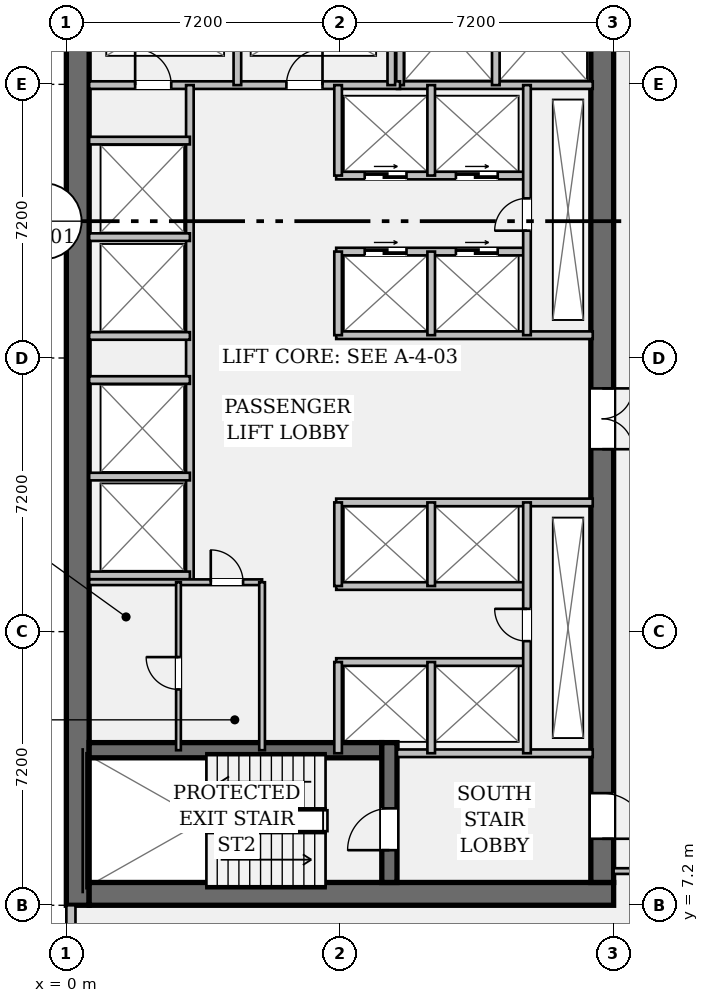
"""IFC4 building model, lengths in metres.
Left out: names, types, materials, properties, quantities, classifications, styles, units other than length and angle.
Written with IfcOpenShell. Run it as: python <this file> out.ifc"""

import sys

from ifc_helpers import new_model, si_unit, direction, frame, frame_2d, origin, place, context, subcontext, project, spatial, rectangle, extrude, element, fill, save


model = new_model("IFC4")
c1 = context("Model", 3, precision=1e-05, world=origin(), true_north=direction((0.0, 1.0)))
c2 = subcontext(c1, "Body", "Model", "MODEL_VIEW")
j1 = project(units=[si_unit("LENGTHUNIT", "METRE"), si_unit("PLANEANGLEUNIT", "RADIAN")], contexts=[c1])
p1 = place(None, origin())
s1 = spatial("IfcSite", under=j1, at=p1, CompositionType="ELEMENT")
p2 = place(p1, origin())
s2 = spatial("IfcBuilding", under=s1, at=p2, CompositionType="ELEMENT")
p3 = place(p2, frame((0.0, 0.0, 9.45)))
s3 = spatial("IfcBuildingStorey", under=s2, at=p3, CompositionType="ELEMENT", Elevation=9.45)
p4 = place(p3, frame((0.3, 7.2, 0.0), z_axis=(0.0, 0.0, 1.0), x_axis=(0.0, 1.0, 0.0)))
e1 = element("IfcWall", 1, at=p4, inside=s3, PredefinedType="SHEAR", context=c2, shape_type="SweptSolid", body=[
    extrude(rectangle(XDim=28.8, YDim=0.6, at=frame_2d((14.4, 0.0))), origin(), (0.0, 0.0, 1.0), 3.9),
])
p5 = place(p3, frame((0.6, 7.5, 0.0), z_axis=(0.0, 0.0, 1.0), x_axis=(1.0, 0.0, 0.0)))
e2 = element("IfcWall", 2, at=p5, inside=s3, PredefinedType="SHEAR", context=c2, shape_type="SweptSolid", body=[
    extrude(rectangle(XDim=13.8, YDim=0.6, at=frame_2d((6.9, 0.0))), origin(), (0.0, 0.0, 1.0), 3.9),
])
p6 = place(p3, frame((14.1, 35.4, 0.0), z_axis=(0.0, 0.0, 1.0), x_axis=(0.0, -1.0, 0.0)))
e3 = element("IfcWall", 3, at=p6, inside=s3, PredefinedType="SHEAR", context=c2, shape_type="SweptSolid", body=[
    extrude(rectangle(XDim=27.6, YDim=0.6, at=frame_2d((13.8, 0.0))), origin(), (0.0, 0.0, 1.0), 3.9),
])
p7 = place(p6, frame((1.3, 0.0, 0.0)))
e4 = element("IfcOpeningElement", 4, at=p7, cuts=e3, PredefinedType="OPENING", context=c2, shape_type="SweptSolid", body=[
    extrude(rectangle(XDim=1.2, YDim=2.15, at=frame_2d((0.6, 1.075))), frame((0.0, 0.312, 0.0), z_axis=(0.0, -1.0, 0.0), x_axis=(1.0, 0.0, 0.0)), (0.0, 0.0, 1.0), 0.624),
])
p8 = place(p6, frame((25.25, 0.0, 0.0)))
e5 = element("IfcOpeningElement", 5, at=p8, cuts=e3, PredefinedType="OPENING", context=c2, shape_type="SweptSolid", body=[
    extrude(rectangle(XDim=1.2, YDim=2.15, at=frame_2d((0.6, 1.075))), frame((0.0, 0.312, 0.0), z_axis=(0.0, -1.0, 0.0), x_axis=(1.0, 0.0, 0.0)), (0.0, 0.0, 1.0), 0.624),
])
p9 = place(p6, frame((14.6, 0.0, 0.0)))
e6 = element("IfcOpeningElement", 6, at=p9, cuts=e3, PredefinedType="OPENING", context=c2, shape_type="SweptSolid", body=[
    extrude(rectangle(XDim=1.6, YDim=2.2, at=frame_2d((0.8, 1.1))), frame((0.0, 0.312, 0.0), z_axis=(0.0, -1.0, 0.0), x_axis=(1.0, 0.0, 0.0)), (0.0, 0.0, 1.0), 0.624),
])
p10 = place(p3, frame((0.6, 11.28, 0.0), z_axis=(0.0, 0.0, 1.0), x_axis=(1.0, 0.0, 0.0)))
e7 = element("IfcWall", 7, at=p10, inside=s3, PredefinedType="SHEAR", context=c2, shape_type="SweptSolid", body=[
    extrude(rectangle(XDim=7.7, YDim=0.4, at=frame_2d((3.85, 0.0))), origin(), (0.0, 0.0, 1.0), 3.9),
])
p11 = place(p3, frame((8.5, 7.8, 0.0), z_axis=(0.0, 0.0, 1.0), x_axis=(0.0, 1.0, 0.0)))
e8 = element("IfcWall", 8, at=p11, inside=s3, PredefinedType="SHEAR", context=c2, shape_type="SweptSolid", body=[
    extrude(rectangle(XDim=3.68, YDim=0.4, at=frame_2d((1.84, 0.0))), origin(), (0.0, 0.0, 1.0), 3.9),
])
p12 = place(p11, frame((0.85, 0.0, 0.0)))
e9 = element("IfcOpeningElement", 9, at=p12, cuts=e8, PredefinedType="OPENING", context=c2, shape_type="SweptSolid", body=[
    extrude(rectangle(XDim=1.1, YDim=2.15, at=frame_2d((0.55, 1.075))), frame((0.0, 0.212, 0.0), z_axis=(0.0, -1.0, 0.0), x_axis=(1.0, 0.0, 0.0)), (0.0, 0.0, 1.0), 0.424),
])
p13 = place(p3, frame((0.12, 2.82, 0.0), z_axis=(0.0, 0.0, 1.0), x_axis=(0.0, 1.0, 0.0)))
e10 = element("IfcWall", 10, at=p13, inside=s3, PredefinedType="STANDARD", context=c2, shape_type="SweptSolid", body=[
    extrude(rectangle(XDim=4.38, YDim=0.24, at=frame_2d((2.19, 0.0))), origin(), (0.0, 0.0, 1.0), 3.9),
])
p14 = place(p13, frame((0.99, 0.0, 0.95)))
e11 = element("IfcOpeningElement", 11, at=p14, cuts=e10, PredefinedType="OPENING", context=c2, shape_type="SweptSolid", body=[
    extrude(rectangle(XDim=2.4, YDim=1.8, at=frame_2d((1.2, 0.9))), frame((0.0, 0.132, 0.0), z_axis=(0.0, -1.0, 0.0), x_axis=(1.0, 0.0, 0.0)), (0.0, 0.0, 1.0), 0.264),
])
for number, where, z_axis, x_axis in (
    (12, (8.7, 11.2, 0.0), (0.0, 0.0, 1.0), (1.0, 0.0, 0.0)),
    (13, (8.7, 28.78, 0.0), (0.0, 0.0, 1.0), (1.0, 0.0, 0.0)),
):
    element("IfcWall", number, at=place(p3, frame(where, z_axis=z_axis, x_axis=x_axis)), inside=s3, PredefinedType="PARTITIONING", context=c2, shape_type="SweptSolid", body=[
        extrude(rectangle(XDim=5.15, YDim=0.2, at=frame_2d((2.575, 0.0))), origin(), (0.0, 0.0, 1.0), 3.9),
    ])
for number, where, z_axis, x_axis in (
    (14, (8.78, 28.78, 0.0), (0.0, 0.0, 1.0), (0.0, 1.0, 0.0)),
    (15, (11.3, 28.78, 0.0), (0.0, 0.0, 1.0), (0.0, 1.0, 0.0)),
):
    element("IfcWall", number, at=place(p3, frame(where, z_axis=z_axis, x_axis=x_axis)), inside=s3, PredefinedType="PARTITIONING", context=c2, shape_type="SweptSolid", body=[
        extrude(rectangle(XDim=3.1, YDim=0.2, at=frame_2d((1.55, 0.0))), origin(), (0.0, 0.0, 1.0), 3.9),
    ])
p15 = place(p3, frame((0.6, 28.78, 0.0), z_axis=(0.0, 0.0, 1.0), x_axis=(1.0, 0.0, 0.0)))
e16 = element("IfcWall", 16, at=p15, inside=s3, PredefinedType="PARTITIONING", context=c2, shape_type="SweptSolid", body=[
    extrude(rectangle(XDim=8.18, YDim=0.2, at=frame_2d((4.09, 0.0))), origin(), (0.0, 0.0, 1.0), 3.9),
])
p16 = place(p15, frame((1.21, 0.0, 0.0)))
e17 = element("IfcOpeningElement", 17, at=p16, cuts=e16, PredefinedType="OPENING", context=c2, shape_type="SweptSolid", body=[
    extrude(rectangle(XDim=0.95, YDim=2.15, at=frame_2d((0.475, 1.075))), frame((0.0, 0.112, 0.0), z_axis=(0.0, -1.0, 0.0), x_axis=(1.0, 0.0, 0.0)), (0.0, 0.0, 1.0), 0.224),
])
p17 = place(p15, frame((5.19, 0.0, 0.0)))
e18 = element("IfcOpeningElement", 18, at=p17, cuts=e16, PredefinedType="OPENING", context=c2, shape_type="SweptSolid", body=[
    extrude(rectangle(XDim=0.95, YDim=2.15, at=frame_2d((0.475, 1.075))), frame((0.0, 0.112, 0.0), z_axis=(0.0, -1.0, 0.0), x_axis=(1.0, 0.0, 0.0)), (0.0, 0.0, 1.0), 0.224),
])
for number, where, z_axis, x_axis in (
    (19, (4.5, 28.78, 0.0), (0.0, 0.0, 1.0), (0.0, 1.0, 0.0)),
    (20, (8.55, 28.78, 0.0), (0.0, 0.0, 1.0), (0.0, 1.0, 0.0)),
):
    element("IfcWall", number, at=place(p3, frame(where, z_axis=z_axis, x_axis=x_axis)), inside=s3, PredefinedType="PARTITIONING", context=c2, shape_type="SweptSolid", body=[
        extrude(rectangle(XDim=2.94, YDim=0.2, at=frame_2d((1.47, 0.0))), origin(), (0.0, 0.0, 1.0), 3.9),
    ])
p18 = place(p3, frame((3.25, 15.7, 0.0), z_axis=(0.0, 0.0, 1.0), x_axis=(0.0, 1.0, 0.0)))
e21 = element("IfcWall", 21, at=p18, inside=s3, PredefinedType="PARTITIONING", context=c2, shape_type="SweptSolid", body=[
    extrude(rectangle(XDim=13.08, YDim=0.2, at=frame_2d((6.54, 0.0))), origin(), (0.0, 0.0, 1.0), 3.9),
])
for number, where, z_axis, x_axis in (
    (22, (0.6, 15.88, 0.0), (0.0, 0.0, 1.0), (1.0, 0.0, 0.0)),
    (23, (0.6, 18.48, 0.0), (0.0, 0.0, 1.0), (1.0, 0.0, 0.0)),
    (24, (0.6, 22.18, 0.0), (0.0, 0.0, 1.0), (1.0, 0.0, 0.0)),
    (25, (0.6, 24.78, 0.0), (0.0, 0.0, 1.0), (1.0, 0.0, 0.0)),
    (26, (0.6, 21.02, 0.0), (0.0, 0.0, 1.0), (1.0, 0.0, 0.0)),
    (27, (0.6, 27.32, 0.0), (0.0, 0.0, 1.0), (1.0, 0.0, 0.0)),
):
    element("IfcWall", number, at=place(p3, frame(where, z_axis=z_axis, x_axis=x_axis)), inside=s3, PredefinedType="PARTITIONING", context=c2, shape_type="SweptSolid", body=[
        extrude(rectangle(XDim=2.65, YDim=0.2, at=frame_2d((1.325, 0.0))), origin(), (0.0, 0.0, 1.0), 3.9),
    ])
p19 = place(p3, frame((7.1, 22.2, 0.0), z_axis=(0.0, 0.0, 1.0), x_axis=(1.0, 0.0, 0.0)))
e28 = element("IfcWall", 28, at=p19, inside=s3, PredefinedType="PARTITIONING", context=c2, shape_type="SweptSolid", body=[
    extrude(rectangle(XDim=6.75, YDim=0.2, at=frame_2d((3.375, 0.0))), origin(), (0.0, 0.0, 1.0), 3.9),
])
p20 = place(p3, frame((7.1, 24.4, 0.0), z_axis=(0.0, 0.0, 1.0), x_axis=(1.0, 0.0, 0.0)))
e29 = element("IfcWall", 29, at=p20, inside=s3, PredefinedType="PARTITIONING", context=c2, shape_type="SweptSolid", body=[
    extrude(rectangle(XDim=5.02, YDim=0.2, at=frame_2d((2.51, 0.0))), origin(), (0.0, 0.0, 1.0), 3.9),
])
p21 = place(p20, frame((0.75, 0.0, 0.0)))
e30 = element("IfcOpeningElement", 30, at=p21, cuts=e29, PredefinedType="OPENING", context=c2, shape_type="SweptSolid", body=[
    extrude(rectangle(XDim=1.1, YDim=2.2, at=frame_2d((0.55, 1.1))), frame((0.0, 0.112, 0.0), z_axis=(0.0, -1.0, 0.0), x_axis=(1.0, 0.0, 0.0)), (0.0, 0.0, 1.0), 0.224),
])
p22 = place(p20, frame((3.15, 0.0, 0.0)))
e31 = element("IfcOpeningElement", 31, at=p22, cuts=e29, PredefinedType="OPENING", context=c2, shape_type="SweptSolid", body=[
    extrude(rectangle(XDim=1.1, YDim=2.2, at=frame_2d((0.55, 1.1))), frame((0.0, 0.112, 0.0), z_axis=(0.0, -1.0, 0.0), x_axis=(1.0, 0.0, 0.0)), (0.0, 0.0, 1.0), 0.224),
])
p23 = place(p3, frame((7.1, 26.4, 0.0), z_axis=(0.0, 0.0, 1.0), x_axis=(1.0, 0.0, 0.0)))
e32 = element("IfcWall", 32, at=p23, inside=s3, PredefinedType="PARTITIONING", context=c2, shape_type="SweptSolid", body=[
    extrude(rectangle(XDim=5.02, YDim=0.2, at=frame_2d((2.51, 0.0))), origin(), (0.0, 0.0, 1.0), 3.9),
])
p24 = place(p23, frame((0.75, 0.0, 0.0)))
e33 = element("IfcOpeningElement", 33, at=p24, cuts=e32, PredefinedType="OPENING", context=c2, shape_type="SweptSolid", body=[
    extrude(rectangle(XDim=1.1, YDim=2.2, at=frame_2d((0.55, 1.1))), frame((0.0, 0.112, 0.0), z_axis=(0.0, -1.0, 0.0), x_axis=(1.0, 0.0, 0.0)), (0.0, 0.0, 1.0), 0.224),
])
p25 = place(p23, frame((3.15, 0.0, 0.0)))
e34 = element("IfcOpeningElement", 34, at=p25, cuts=e32, PredefinedType="OPENING", context=c2, shape_type="SweptSolid", body=[
    extrude(rectangle(XDim=1.1, YDim=2.2, at=frame_2d((0.55, 1.1))), frame((0.0, 0.112, 0.0), z_axis=(0.0, -1.0, 0.0), x_axis=(1.0, 0.0, 0.0)), (0.0, 0.0, 1.0), 0.224),
])
p26 = place(p3, frame((7.15, 22.2, 0.0), z_axis=(0.0, 0.0, 1.0), x_axis=(0.0, 1.0, 0.0)))
e35 = element("IfcWall", 35, at=p26, inside=s3, PredefinedType="PARTITIONING", context=c2, shape_type="SweptSolid", body=[
    extrude(rectangle(XDim=2.2, YDim=0.2, at=frame_2d((1.1, 0.0))), origin(), (0.0, 0.0, 1.0), 3.9),
])
p27 = place(p3, frame((7.15, 26.4, 0.0), z_axis=(0.0, 0.0, 1.0), x_axis=(0.0, 1.0, 0.0)))
e36 = element("IfcWall", 36, at=p27, inside=s3, PredefinedType="PARTITIONING", context=c2, shape_type="SweptSolid", body=[
    extrude(rectangle(XDim=2.38, YDim=0.2, at=frame_2d((1.19, 0.0))), origin(), (0.0, 0.0, 1.0), 3.9),
])
p28 = place(p3, frame((9.6, 22.2, 0.0), z_axis=(0.0, 0.0, 1.0), x_axis=(0.0, 1.0, 0.0)))
e37 = element("IfcWall", 37, at=p28, inside=s3, PredefinedType="PARTITIONING", context=c2, shape_type="SweptSolid", body=[
    extrude(rectangle(XDim=2.2, YDim=0.2, at=frame_2d((1.1, 0.0))), origin(), (0.0, 0.0, 1.0), 3.9),
])
p29 = place(p3, frame((9.6, 26.4, 0.0), z_axis=(0.0, 0.0, 1.0), x_axis=(0.0, 1.0, 0.0)))
e38 = element("IfcWall", 38, at=p29, inside=s3, PredefinedType="PARTITIONING", context=c2, shape_type="SweptSolid", body=[
    extrude(rectangle(XDim=2.38, YDim=0.2, at=frame_2d((1.19, 0.0))), origin(), (0.0, 0.0, 1.0), 3.9),
])
p30 = place(p3, frame((12.12, 22.2, 0.0), z_axis=(0.0, 0.0, 1.0), x_axis=(0.0, 1.0, 0.0)))
e39 = element("IfcWall", 39, at=p30, inside=s3, PredefinedType="PARTITIONING", context=c2, shape_type="SweptSolid", body=[
    extrude(rectangle(XDim=6.58, YDim=0.2, at=frame_2d((3.29, 0.0))), origin(), (0.0, 0.0, 1.0), 3.9),
])
p31 = place(p30, frame((2.75, 0.0, 0.0)))
e40 = element("IfcOpeningElement", 40, at=p31, cuts=e39, PredefinedType="OPENING", context=c2, shape_type="SweptSolid", body=[
    extrude(rectangle(XDim=0.85, YDim=2.15, at=frame_2d((0.425, 1.075))), frame((0.0, 0.112, 0.0), z_axis=(0.0, -1.0, 0.0), x_axis=(1.0, 0.0, 0.0)), (0.0, 0.0, 1.0), 0.224),
])
p32 = place(p3, frame((7.1, 17.8, 0.0), z_axis=(0.0, 0.0, 1.0), x_axis=(1.0, 0.0, 0.0)))
e41 = element("IfcWall", 41, at=p32, inside=s3, PredefinedType="PARTITIONING", context=c2, shape_type="SweptSolid", body=[
    extrude(rectangle(XDim=6.75, YDim=0.2, at=frame_2d((3.375, 0.0))), origin(), (0.0, 0.0, 1.0), 3.9),
])
for number, where, z_axis, x_axis in (
    (42, (7.1, 15.6, 0.0), (0.0, 0.0, 1.0), (1.0, 0.0, 0.0)),
    (43, (7.1, 13.6, 0.0), (0.0, 0.0, 1.0), (1.0, 0.0, 0.0)),
):
    element("IfcWall", number, at=place(p3, frame(where, z_axis=z_axis, x_axis=x_axis)), inside=s3, PredefinedType="PARTITIONING", context=c2, shape_type="SweptSolid", body=[
        extrude(rectangle(XDim=5.02, YDim=0.2, at=frame_2d((2.51, 0.0))), origin(), (0.0, 0.0, 1.0), 3.9),
    ])
p33 = place(p3, frame((7.15, 15.6, 0.0), z_axis=(0.0, 0.0, 1.0), x_axis=(0.0, 1.0, 0.0)))
e44 = element("IfcWall", 44, at=p33, inside=s3, PredefinedType="PARTITIONING", context=c2, shape_type="SweptSolid", body=[
    extrude(rectangle(XDim=2.2, YDim=0.2, at=frame_2d((1.1, 0.0))), origin(), (0.0, 0.0, 1.0), 3.9),
])
p34 = place(p3, frame((7.15, 11.2, 0.0), z_axis=(0.0, 0.0, 1.0), x_axis=(0.0, 1.0, 0.0)))
e45 = element("IfcWall", 45, at=p34, inside=s3, PredefinedType="PARTITIONING", context=c2, shape_type="SweptSolid", body=[
    extrude(rectangle(XDim=2.4, YDim=0.2, at=frame_2d((1.2, 0.0))), origin(), (0.0, 0.0, 1.0), 3.9),
])
p35 = place(p3, frame((9.6, 15.6, 0.0), z_axis=(0.0, 0.0, 1.0), x_axis=(0.0, 1.0, 0.0)))
e46 = element("IfcWall", 46, at=p35, inside=s3, PredefinedType="PARTITIONING", context=c2, shape_type="SweptSolid", body=[
    extrude(rectangle(XDim=2.2, YDim=0.2, at=frame_2d((1.1, 0.0))), origin(), (0.0, 0.0, 1.0), 3.9),
])
p36 = place(p3, frame((9.6, 11.2, 0.0), z_axis=(0.0, 0.0, 1.0), x_axis=(0.0, 1.0, 0.0)))
e47 = element("IfcWall", 47, at=p36, inside=s3, PredefinedType="PARTITIONING", context=c2, shape_type="SweptSolid", body=[
    extrude(rectangle(XDim=2.4, YDim=0.2, at=frame_2d((1.2, 0.0))), origin(), (0.0, 0.0, 1.0), 3.9),
])
p37 = place(p3, frame((12.12, 11.2, 0.0), z_axis=(0.0, 0.0, 1.0), x_axis=(0.0, 1.0, 0.0)))
e48 = element("IfcWall", 48, at=p37, inside=s3, PredefinedType="PARTITIONING", context=c2, shape_type="SweptSolid", body=[
    extrude(rectangle(XDim=6.6, YDim=0.2, at=frame_2d((3.3, 0.0))), origin(), (0.0, 0.0, 1.0), 3.9),
])
p38 = place(p37, frame((2.95, 0.0, 0.0)))
e49 = element("IfcOpeningElement", 49, at=p38, cuts=e48, PredefinedType="OPENING", context=c2, shape_type="SweptSolid", body=[
    extrude(rectangle(XDim=0.85, YDim=2.15, at=frame_2d((0.425, 1.075))), frame((0.0, 0.112, 0.0), z_axis=(0.0, -1.0, 0.0), x_axis=(1.0, 0.0, 0.0)), (0.0, 0.0, 1.0), 0.224),
])
p39 = place(p3, frame((0.6, 15.7, 0.0), z_axis=(0.0, 0.0, 1.0), x_axis=(1.0, 0.0, 0.0)))
e50 = element("IfcWall", 50, at=p39, inside=s3, PredefinedType="PARTITIONING", context=c2, shape_type="SweptSolid", body=[
    extrude(rectangle(XDim=4.55, YDim=0.15, at=frame_2d((2.275, 0.0))), origin(), (0.0, 0.0, 1.0), 3.9),
])
p40 = place(p39, frame((3.2, 0.0, 0.0)))
e51 = element("IfcOpeningElement", 51, at=p40, cuts=e50, PredefinedType="OPENING", context=c2, shape_type="SweptSolid", body=[
    extrude(rectangle(XDim=0.85, YDim=2.15, at=frame_2d((0.425, 1.075))), frame((0.0, 0.087, 0.0), z_axis=(0.0, -1.0, 0.0), x_axis=(1.0, 0.0, 0.0)), (0.0, 0.0, 1.0), 0.174),
])
p41 = place(p3, frame((5.15, 11.28, 0.0), z_axis=(0.0, 0.0, 1.0), x_axis=(0.0, 1.0, 0.0)))
e52 = element("IfcWall", 52, at=p41, inside=s3, PredefinedType="PARTITIONING", context=c2, shape_type="SweptSolid", body=[
    extrude(rectangle(XDim=4.42, YDim=0.15, at=frame_2d((2.21, 0.0))), origin(), (0.0, 0.0, 1.0), 3.9),
])
p42 = place(p3, frame((2.95, 11.28, 0.0), z_axis=(0.0, 0.0, 1.0), x_axis=(0.0, 1.0, 0.0)))
e53 = element("IfcWall", 53, at=p42, inside=s3, PredefinedType="PARTITIONING", context=c2, shape_type="SweptSolid", body=[
    extrude(rectangle(XDim=4.42, YDim=0.125, at=frame_2d((2.21, 0.0))), origin(), (0.0, 0.0, 1.0), 3.9),
])
p43 = place(p42, frame((1.6, 0.0, 0.0)))
e54 = element("IfcOpeningElement", 54, at=p43, cuts=e53, PredefinedType="OPENING", context=c2, shape_type="SweptSolid", body=[
    extrude(rectangle(XDim=0.85, YDim=2.15, at=frame_2d((0.425, 1.075))), frame((0.0, 0.074, 0.0), z_axis=(0.0, -1.0, 0.0), x_axis=(1.0, 0.0, 0.0)), (0.0, 0.0, 1.0), 0.149),
])
p44 = place(p3, frame((14.4, 8.1, 0.0), z_axis=(0.0, 0.0, 1.0), x_axis=(1.0, 0.0, 0.0)))
e55 = element("IfcWall", 55, at=p44, inside=s3, PredefinedType="PARTITIONING", context=c2, shape_type="SweptSolid", body=[
    extrude(rectangle(XDim=55.6, YDim=0.15, at=frame_2d((27.8, 0.0))), origin(), (0.0, 0.0, 1.0), 2.938),
])
p45 = place(p44, frame((1.1, 0.0, 0.0)))
e56 = element("IfcOpeningElement", 56, at=p45, cuts=e55, PredefinedType="OPENING", context=c2, shape_type="SweptSolid", body=[
    extrude(rectangle(XDim=1.0, YDim=2.15, at=frame_2d((0.5, 1.075))), frame((0.0, 0.087, 0.0), z_axis=(0.0, -1.0, 0.0), x_axis=(1.0, 0.0, 0.0)), (0.0, 0.0, 1.0), 0.174),
])
p46 = place(p12, origin())
e57 = element("IfcDoor", 57, at=p46, inside=s3, OperationType="SINGLE_SWING_LEFT", PredefinedType="DOOR", context=c2, shape_type="SweptSolid", body=[
    extrude(rectangle(XDim=1.1, YDim=2.15, at=frame_2d((0.55, 1.075))), frame((0.0, 0.025, 0.0), z_axis=(0.0, -1.0, 0.0), x_axis=(1.0, 0.0, 0.0)), (0.0, 0.0, 1.0), 0.05),
])
fill(e9, e57)
p47 = place(p8, origin())
e58 = element("IfcDoor", 58, at=p47, inside=s3, OperationType="SINGLE_SWING_RIGHT", PredefinedType="DOOR", context=c2, shape_type="SweptSolid", body=[
    extrude(rectangle(XDim=1.2, YDim=2.15, at=frame_2d((0.6, 1.075))), frame((0.0, 0.025, 0.0), z_axis=(0.0, -1.0, 0.0), x_axis=(1.0, 0.0, 0.0)), (0.0, 0.0, 1.0), 0.05),
])
fill(e5, e58)
p48 = place(p16, origin())
e59 = element("IfcDoor", 59, at=p48, inside=s3, OperationType="SINGLE_SWING_LEFT", PredefinedType="DOOR", context=c2, shape_type="SweptSolid", body=[
    extrude(rectangle(XDim=0.95, YDim=2.15, at=frame_2d((0.475, 1.075))), frame((0.0, 0.025, 0.0), z_axis=(0.0, -1.0, 0.0), x_axis=(1.0, 0.0, 0.0)), (0.0, 0.0, 1.0), 0.05),
])
fill(e17, e59)
p49 = place(p17, origin())
e60 = element("IfcDoor", 60, at=p49, inside=s3, OperationType="SINGLE_SWING_RIGHT", PredefinedType="DOOR", context=c2, shape_type="SweptSolid", body=[
    extrude(rectangle(XDim=0.95, YDim=2.15, at=frame_2d((0.475, 1.075))), frame((0.0, 0.025, 0.0), z_axis=(0.0, -1.0, 0.0), x_axis=(1.0, 0.0, 0.0)), (0.0, 0.0, 1.0), 0.05),
])
fill(e18, e60)
p50 = place(p9, origin())
e61 = element("IfcDoor", 61, at=p50, inside=s3, OperationType="DOUBLE_DOOR_SINGLE_SWING", PredefinedType="DOOR", context=c2, shape_type="SweptSolid", body=[
    extrude(rectangle(XDim=1.6, YDim=2.2, at=frame_2d((0.8, 1.1))), frame((0.0, 0.025, 0.0), z_axis=(0.0, -1.0, 0.0), x_axis=(1.0, 0.0, 0.0)), (0.0, 0.0, 1.0), 0.05),
])
fill(e6, e61)
p51 = place(p31, origin())
e62 = element("IfcDoor", 62, at=p51, inside=s3, OperationType="SINGLE_SWING_LEFT", PredefinedType="DOOR", context=c2, shape_type="SweptSolid", body=[
    extrude(rectangle(XDim=0.85, YDim=2.15, at=frame_2d((0.425, 1.075))), frame((0.0, 0.025, 0.0), z_axis=(0.0, -1.0, 0.0), x_axis=(1.0, 0.0, 0.0)), (0.0, 0.0, 1.0), 0.05),
])
fill(e40, e62)
p52 = place(p21, origin())
e63 = element("IfcDoor", 63, at=p52, inside=s3, OperationType="DOUBLE_DOOR_SLIDING", PredefinedType="DOOR", context=c2, shape_type="SweptSolid", body=[
    extrude(rectangle(XDim=1.1, YDim=2.2, at=frame_2d((0.55, 1.1))), frame((0.0, 0.025, 0.0), z_axis=(0.0, -1.0, 0.0), x_axis=(1.0, 0.0, 0.0)), (0.0, 0.0, 1.0), 0.05),
])
fill(e30, e63)
p53 = place(p22, origin())
e64 = element("IfcDoor", 64, at=p53, inside=s3, OperationType="DOUBLE_DOOR_SLIDING", PredefinedType="DOOR", context=c2, shape_type="SweptSolid", body=[
    extrude(rectangle(XDim=1.1, YDim=2.2, at=frame_2d((0.55, 1.1))), frame((0.0, 0.025, 0.0), z_axis=(0.0, -1.0, 0.0), x_axis=(1.0, 0.0, 0.0)), (0.0, 0.0, 1.0), 0.05),
])
fill(e31, e64)
p54 = place(p24, origin())
e65 = element("IfcDoor", 65, at=p54, inside=s3, OperationType="DOUBLE_DOOR_SLIDING", PredefinedType="DOOR", context=c2, shape_type="SweptSolid", body=[
    extrude(rectangle(XDim=1.1, YDim=2.2, at=frame_2d((0.55, 1.1))), frame((0.0, 0.025, 0.0), z_axis=(0.0, -1.0, 0.0), x_axis=(1.0, 0.0, 0.0)), (0.0, 0.0, 1.0), 0.05),
])
fill(e33, e65)
p55 = place(p25, origin())
e66 = element("IfcDoor", 66, at=p55, inside=s3, OperationType="DOUBLE_DOOR_SLIDING", PredefinedType="DOOR", context=c2, shape_type="SweptSolid", body=[
    extrude(rectangle(XDim=1.1, YDim=2.2, at=frame_2d((0.55, 1.1))), frame((0.0, 0.025, 0.0), z_axis=(0.0, -1.0, 0.0), x_axis=(1.0, 0.0, 0.0)), (0.0, 0.0, 1.0), 0.05),
])
fill(e34, e66)
p56 = place(p38, origin())
e67 = element("IfcDoor", 67, at=p56, inside=s3, OperationType="SINGLE_SWING_RIGHT", PredefinedType="DOOR", context=c2, shape_type="SweptSolid", body=[
    extrude(rectangle(XDim=0.85, YDim=2.15, at=frame_2d((0.425, 1.075))), frame((0.0, 0.025, 0.0), z_axis=(0.0, -1.0, 0.0), x_axis=(1.0, 0.0, 0.0)), (0.0, 0.0, 1.0), 0.05),
])
fill(e49, e67)
p57 = place(p40, origin())
e68 = element("IfcDoor", 68, at=p57, inside=s3, OperationType="SINGLE_SWING_LEFT", PredefinedType="DOOR", context=c2, shape_type="SweptSolid", body=[
    extrude(rectangle(XDim=0.85, YDim=2.15, at=frame_2d((0.425, 1.075))), frame((0.0, 0.025, 0.0), z_axis=(0.0, -1.0, 0.0), x_axis=(1.0, 0.0, 0.0)), (0.0, 0.0, 1.0), 0.05),
])
fill(e51, e68)
p58 = place(p43, origin())
e69 = element("IfcDoor", 69, at=p58, inside=s3, OperationType="SINGLE_SWING_RIGHT", PredefinedType="DOOR", context=c2, shape_type="SweptSolid", body=[
    extrude(rectangle(XDim=0.85, YDim=2.15, at=frame_2d((0.425, 1.075))), frame((0.0, 0.025, 0.0), z_axis=(0.0, -1.0, 0.0), x_axis=(1.0, 0.0, 0.0)), (0.0, 0.0, 1.0), 0.05),
])
fill(e54, e69)
save(model, sys.argv[1])
